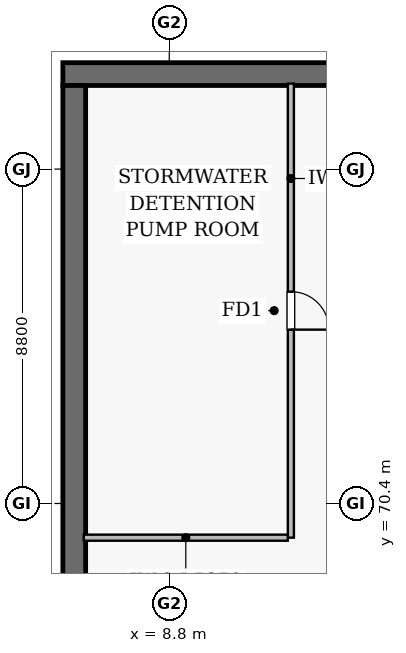
"""IFC4 building model, lengths in metres.
Left out: names, types, materials, properties, quantities, classifications, styles, units other than length and angle.
Written with IfcOpenShell. Run it as: python <this file> out.ifc"""

import sys

from ifc_helpers import new_model, si_unit, direction, frame, frame_2d, origin, place, context, subcontext, project, spatial, rectangle, extrude, element, fill, save


model = new_model("IFC4")
c1 = context("Model", 3, precision=1e-05, world=origin(), true_north=direction((0.0, 1.0)))
c2 = subcontext(c1, "Body", "Model", "MODEL_VIEW")
j1 = project(units=[si_unit("LENGTHUNIT", "METRE"), si_unit("PLANEANGLEUNIT", "RADIAN")], contexts=[c1])
p1 = place(None, origin())
s1 = spatial("IfcSite", under=j1, at=p1, CompositionType="ELEMENT")
p2 = place(p1, origin())
s2 = spatial("IfcBuilding", under=s1, at=p2, CompositionType="ELEMENT")
p3 = place(p2, frame((0.0, 0.0, -15.6)))
s3 = spatial("IfcBuildingStorey", under=s2, at=p3, CompositionType="ELEMENT", Elevation=-15.6)
p4 = place(p3, frame((82.0, 81.7, 0.0), z_axis=(0.0, 0.0, 1.0), x_axis=(-1.0, 0.0, 0.0)))
e1 = element("IfcWall", 1, at=p4, inside=s3, PredefinedType="SOLIDWALL", context=c2, shape_type="SweptSolid", body=[
    extrude(rectangle(XDim=76.0, YDim=0.6, at=frame_2d((38.0, 0.0))), origin(), (0.0, 0.0, 1.0), 3.58),
])
p5 = place(p3, frame((6.3, 81.4, 0.0), z_axis=(0.0, 0.0, 1.0), x_axis=(0.0, -1.0, 0.0)))
e2 = element("IfcWall", 2, at=p5, inside=s3, PredefinedType="SOLIDWALL", context=c2, shape_type="SweptSolid", body=[
    extrude(rectangle(XDim=74.8, YDim=0.6, at=frame_2d((37.4, 0.0))), origin(), (0.0, 0.0, 1.0), 3.58),
])
p6 = place(p3, frame((12.0, 81.45, 0.0), z_axis=(0.0, 0.0, 1.0), x_axis=(0.0, -1.0, 0.0)))
e3 = element("IfcWall", 3, at=p6, inside=s3, PredefinedType="SOLIDWALL", context=c2, shape_type="SweptSolid", body=[
    extrude(rectangle(XDim=11.95, YDim=0.16, at=frame_2d((5.975, 0.0))), origin(), (0.0, 0.0, 1.0), 3.58),
])
p7 = place(p6, frame((5.475, 0.0, 0.0)))
e4 = element("IfcOpeningElement", 4, at=p7, cuts=e3, PredefinedType="OPENING", context=c2, shape_type="SweptSolid", body=[
    extrude(rectangle(XDim=1.0, YDim=2.15, at=frame_2d((0.5, 1.075))), frame((0.0, 0.09, 0.0), z_axis=(0.0, -1.0, 0.0), x_axis=(1.0, 0.0, 0.0)), (0.0, 0.0, 1.0), 0.18),
])
p8 = place(p3, frame((11.92, 69.5, 0.0), z_axis=(0.0, 0.0, 1.0), x_axis=(-1.0, 0.0, 0.0)))
e5 = element("IfcWall", 5, at=p8, inside=s3, PredefinedType="SOLIDWALL", context=c2, shape_type="SweptSolid", body=[
    extrude(rectangle(XDim=5.37, YDim=0.16, at=frame_2d((2.685, 0.0))), origin(), (0.0, 0.0, 1.0), 3.58),
])
p9 = place(p7, origin())
e6 = element("IfcDoor", 6, at=p9, inside=s3, OperationType="SINGLE_SWING_RIGHT", PredefinedType="DOOR", context=c2, shape_type="SweptSolid", body=[
    extrude(rectangle(XDim=1.0, YDim=2.15, at=frame_2d((0.5, 1.075))), frame((0.0, 0.025, 0.0), z_axis=(0.0, -1.0, 0.0), x_axis=(1.0, 0.0, 0.0)), (0.0, 0.0, 1.0), 0.05),
])
fill(e4, e6)
save(model, sys.argv[1])
